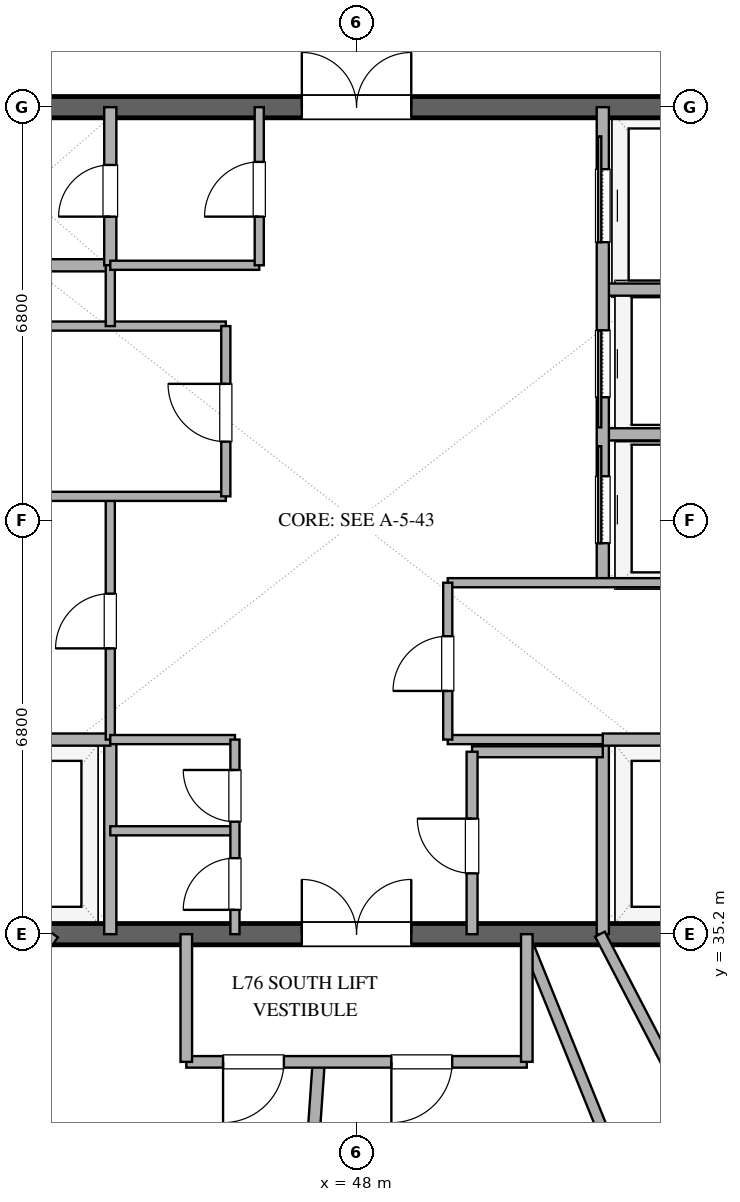
"""IFC4 building model, lengths in metres.
Left out: names, types, materials, properties, quantities, classifications, styles, units other than length and angle.
Written with IfcOpenShell. Run it as: python <this file> out.ifc"""

import sys

from ifc_helpers import new_model, si_unit, direction, frame, frame_2d, origin, place, context, subcontext, project, spatial, rectangle, extrude, element, fill, save


model = new_model("IFC4")
c1 = context("Model", 3, precision=1e-05, world=origin(), true_north=direction((0.0, 1.0)))
c2 = subcontext(c1, "Body", "Model", "MODEL_VIEW")
j1 = project(units=[si_unit("LENGTHUNIT", "METRE"), si_unit("PLANEANGLEUNIT", "RADIAN")], contexts=[c1])
p1 = place(None, origin())
s1 = spatial("IfcSite", under=j1, at=p1, CompositionType="ELEMENT")
p2 = place(p1, origin())
s2 = spatial("IfcBuilding", under=s1, at=p2, CompositionType="ELEMENT")
p3 = place(p2, frame((0.0, 0.0, 294.6)))
s3 = spatial("IfcBuildingStorey", under=s2, at=p3, CompositionType="ELEMENT", Elevation=294.6)
p4 = place(p3, frame((41.0, 35.2, 0.0), z_axis=(0.0, 0.0, 1.0), x_axis=(1.0, 0.0, 0.0)))
e1 = element("IfcWall", 1, at=p4, inside=s3, PredefinedType="SHEAR", context=c2, shape_type="SweptSolid", body=[
    extrude(rectangle(XDim=14.0, YDim=0.35, at=frame_2d((7.0, 0.0))), origin(), (0.0, 0.0, 1.0), 3.37),
])
p5 = place(p4, frame((6.1, 0.0, 0.0)))
e2 = element("IfcOpeningElement", 2, at=p5, cuts=e1, PredefinedType="OPENING", context=c2, shape_type="SweptSolid", body=[
    extrude(rectangle(XDim=1.8, YDim=2.25, at=frame_2d((0.9, 1.125))), frame((0.0, 0.185, 0.0), z_axis=(0.0, -1.0, 0.0), x_axis=(1.0, 0.0, 0.0)), (0.0, 0.0, 1.0), 0.37),
])
p6 = place(p3, frame((41.0, 48.8, 0.0), z_axis=(0.0, 0.0, 1.0), x_axis=(1.0, 0.0, 0.0)))
e3 = element("IfcWall", 3, at=p6, inside=s3, PredefinedType="SHEAR", context=c2, shape_type="SweptSolid", body=[
    extrude(rectangle(XDim=14.0, YDim=0.35, at=frame_2d((7.0, 0.0))), origin(), (0.0, 0.0, 1.0), 3.37),
])
p7 = place(p6, frame((6.1, 0.0, 0.0)))
e4 = element("IfcOpeningElement", 4, at=p7, cuts=e3, PredefinedType="OPENING", context=c2, shape_type="SweptSolid", body=[
    extrude(rectangle(XDim=1.8, YDim=2.25, at=frame_2d((0.9, 1.125))), frame((0.0, 0.185, 0.0), z_axis=(0.0, -1.0, 0.0), x_axis=(1.0, 0.0, 0.0)), (0.0, 0.0, 1.0), 0.37),
])
p8 = place(p3, frame((43.95, 35.2, 0.0), z_axis=(0.0, 0.0, 1.0), x_axis=(0.0, 1.0, 0.0)))
e5 = element("IfcWall", 5, at=p8, inside=s3, PredefinedType="SOLIDWALL", context=c2, shape_type="SweptSolid", body=[
    extrude(rectangle(XDim=3.2, YDim=0.2, at=frame_2d((1.6, 0.0))), origin(), (0.0, 0.0, 1.0), 2.73),
])
p9 = place(p3, frame((41.0, 38.4, 0.0), z_axis=(0.0, 0.0, 1.0), x_axis=(1.0, 0.0, 0.0)))
e6 = element("IfcWall", 6, at=p9, inside=s3, PredefinedType="SOLIDWALL", context=c2, shape_type="SweptSolid", body=[
    extrude(rectangle(XDim=2.95, YDim=0.2, at=frame_2d((1.475, 0.0))), origin(), (0.0, 0.0, 1.0), 2.73),
])
p10 = place(p3, frame((52.05, 35.2, 0.0), z_axis=(0.0, 0.0, 1.0), x_axis=(0.0, 1.0, 0.0)))
e7 = element("IfcWall", 7, at=p10, inside=s3, PredefinedType="SOLIDWALL", context=c2, shape_type="SweptSolid", body=[
    extrude(rectangle(XDim=3.2, YDim=0.2, at=frame_2d((1.6, 0.0))), origin(), (0.0, 0.0, 1.0), 2.73),
])
for number, where, z_axis, x_axis in (
    (8, (52.05, 38.4, 0.0), (0.0, 0.0, 1.0), (1.0, 0.0, 0.0)),
    (9, (41.0, 46.2, 0.0), (0.0, 0.0, 1.0), (1.0, 0.0, 0.0)),
):
    element("IfcWall", number, at=place(p3, frame(where, z_axis=z_axis, x_axis=x_axis)), inside=s3, PredefinedType="SOLIDWALL", context=c2, shape_type="SweptSolid", body=[
        extrude(rectangle(XDim=2.95, YDim=0.2, at=frame_2d((1.475, 0.0))), origin(), (0.0, 0.0, 1.0), 2.73),
    ])
p11 = place(p3, frame((43.95, 46.2, 0.0), z_axis=(0.0, 0.0, 1.0), x_axis=(0.0, 1.0, 0.0)))
e10 = element("IfcWall", 10, at=p11, inside=s3, PredefinedType="SOLIDWALL", context=c2, shape_type="SweptSolid", body=[
    extrude(rectangle(XDim=2.6, YDim=0.2, at=frame_2d((1.3, 0.0))), origin(), (0.0, 0.0, 1.0), 2.73),
])
p12 = place(p11, frame((0.8, 0.0, 0.0)))
e11 = element("IfcOpeningElement", 11, at=p12, cuts=e10, PredefinedType="OPENING", context=c2, shape_type="SweptSolid", body=[
    extrude(rectangle(XDim=0.85, YDim=2.15, at=frame_2d((0.425, 1.075))), frame((0.0, 0.11, 0.0), z_axis=(0.0, -1.0, 0.0), x_axis=(1.0, 0.0, 0.0)), (0.0, 0.0, 1.0), 0.22),
])
p13 = place(p3, frame((43.95, 38.4, 0.0), z_axis=(0.0, 0.0, 1.0), x_axis=(0.0, 1.0, 0.0)))
e12 = element("IfcWall", 12, at=p13, inside=s3, PredefinedType="PARTITIONING", context=c2, shape_type="SweptSolid", body=[
    extrude(rectangle(XDim=4.0, YDim=0.15, at=frame_2d((2.0, 0.0))), origin(), (0.0, 0.0, 1.0), 2.73),
])
p14 = place(p13, frame((1.5, 0.0, 0.0)))
e13 = element("IfcOpeningElement", 13, at=p14, cuts=e12, PredefinedType="OPENING", context=c2, shape_type="SweptSolid", body=[
    extrude(rectangle(XDim=0.9, YDim=2.15, at=frame_2d((0.45, 1.075))), frame((0.0, 0.085, 0.0), z_axis=(0.0, -1.0, 0.0), x_axis=(1.0, 0.0, 0.0)), (0.0, 0.0, 1.0), 0.17),
])
for number, where, z_axis, x_axis in (
    (14, (41.0, 42.4, 0.0), (0.0, 0.0, 1.0), (1.0, 0.0, 0.0)),
    (15, (41.0, 45.2, 0.0), (0.0, 0.0, 1.0), (1.0, 0.0, 0.0)),
):
    element("IfcWall", number, at=place(p3, frame(where, z_axis=z_axis, x_axis=x_axis)), inside=s3, PredefinedType="PARTITIONING", context=c2, shape_type="SweptSolid", body=[
        extrude(rectangle(XDim=4.85, YDim=0.15, at=frame_2d((2.425, 0.0))), origin(), (0.0, 0.0, 1.0), 2.73),
    ])
p15 = place(p3, frame((43.95, 45.2, 0.0), z_axis=(0.0, 0.0, 1.0), x_axis=(0.0, 1.0, 0.0)))
e16 = element("IfcWall", 16, at=p15, inside=s3, PredefinedType="PARTITIONING", context=c2, shape_type="SweptSolid", body=[
    extrude(rectangle(XDim=1.0, YDim=0.15, at=frame_2d((0.5, 0.0))), origin(), (0.0, 0.0, 1.0), 2.73),
])
p16 = place(p3, frame((45.85, 42.4, 0.0), z_axis=(0.0, 0.0, 1.0), x_axis=(0.0, 1.0, 0.0)))
e17 = element("IfcWall", 17, at=p16, inside=s3, PredefinedType="PARTITIONING", context=c2, shape_type="SweptSolid", body=[
    extrude(rectangle(XDim=2.8, YDim=0.15, at=frame_2d((1.4, 0.0))), origin(), (0.0, 0.0, 1.0), 2.73),
])
p17 = place(p16, frame((0.9, 0.0, 0.0)))
e18 = element("IfcOpeningElement", 18, at=p17, cuts=e17, PredefinedType="OPENING", context=c2, shape_type="SweptSolid", body=[
    extrude(rectangle(XDim=0.95, YDim=2.15, at=frame_2d((0.475, 1.075))), frame((0.0, 0.085, 0.0), z_axis=(0.0, -1.0, 0.0), x_axis=(1.0, 0.0, 0.0)), (0.0, 0.0, 1.0), 0.17),
])
for number, where, z_axis, x_axis in (
    (19, (52.05, 43.42, 0.0), (0.0, 0.0, 1.0), (1.0, 0.0, 0.0)),
    (20, (52.05, 45.8, 0.0), (0.0, 0.0, 1.0), (1.0, 0.0, 0.0)),
):
    element("IfcWall", number, at=place(p3, frame(where, z_axis=z_axis, x_axis=x_axis)), inside=s3, PredefinedType="SOLIDWALL", context=c2, shape_type="SweptSolid", body=[
        extrude(rectangle(XDim=2.95, YDim=0.2, at=frame_2d((1.475, 0.0))), origin(), (0.0, 0.0, 1.0), 2.73),
    ])
p18 = place(p3, frame((52.05, 40.98, 0.0), z_axis=(0.0, 0.0, 1.0), x_axis=(0.0, 1.0, 0.0)))
e21 = element("IfcWall", 21, at=p18, inside=s3, PredefinedType="SOLIDWALL", context=c2, shape_type="SweptSolid", body=[
    extrude(rectangle(XDim=7.82, YDim=0.2, at=frame_2d((3.91, 0.0))), origin(), (0.0, 0.0, 1.0), 2.73),
])
p19 = place(p18, frame((0.65, 0.0, 0.0)))
e22 = element("IfcOpeningElement", 22, at=p19, cuts=e21, PredefinedType="OPENING", context=c2, shape_type="SweptSolid", body=[
    extrude(rectangle(XDim=1.1, YDim=2.2, at=frame_2d((0.55, 1.1))), frame((0.0, 0.11, 0.0), z_axis=(0.0, -1.0, 0.0), x_axis=(1.0, 0.0, 0.0)), (0.0, 0.0, 1.0), 0.22),
])
p20 = place(p18, frame((3.05, 0.0, 0.0)))
e23 = element("IfcOpeningElement", 23, at=p20, cuts=e21, PredefinedType="OPENING", context=c2, shape_type="SweptSolid", body=[
    extrude(rectangle(XDim=1.1, YDim=2.2, at=frame_2d((0.55, 1.1))), frame((0.0, 0.11, 0.0), z_axis=(0.0, -1.0, 0.0), x_axis=(1.0, 0.0, 0.0)), (0.0, 0.0, 1.0), 0.22),
])
p21 = place(p18, frame((5.6, 0.0, 0.0)))
e24 = element("IfcOpeningElement", 24, at=p21, cuts=e21, PredefinedType="OPENING", context=c2, shape_type="SweptSolid", body=[
    extrude(rectangle(XDim=1.2, YDim=2.2, at=frame_2d((0.6, 1.1))), frame((0.0, 0.11, 0.0), z_axis=(0.0, -1.0, 0.0), x_axis=(1.0, 0.0, 0.0)), (0.0, 0.0, 1.0), 0.22),
])
p22 = place(p3, frame((49.5, 40.98, 0.0), z_axis=(0.0, 0.0, 1.0), x_axis=(1.0, 0.0, 0.0)))
e25 = element("IfcWall", 25, at=p22, inside=s3, PredefinedType="PARTITIONING", context=c2, shape_type="SweptSolid", body=[
    extrude(rectangle(XDim=5.5, YDim=0.15, at=frame_2d((2.75, 0.0))), origin(), (0.0, 0.0, 1.0), 2.73),
])
p23 = place(p3, frame((49.5, 38.4, 0.0), z_axis=(0.0, 0.0, 1.0), x_axis=(1.0, 0.0, 0.0)))
e26 = element("IfcWall", 26, at=p23, inside=s3, PredefinedType="PARTITIONING", context=c2, shape_type="SweptSolid", body=[
    extrude(rectangle(XDim=2.55, YDim=0.15, at=frame_2d((1.275, 0.0))), origin(), (0.0, 0.0, 1.0), 2.73),
])
p24 = place(p3, frame((49.5, 38.4, 0.0), z_axis=(0.0, 0.0, 1.0), x_axis=(0.0, 1.0, 0.0)))
e27 = element("IfcWall", 27, at=p24, inside=s3, PredefinedType="PARTITIONING", context=c2, shape_type="SweptSolid", body=[
    extrude(rectangle(XDim=2.58, YDim=0.15, at=frame_2d((1.29, 0.0))), origin(), (0.0, 0.0, 1.0), 2.73),
])
p25 = place(p24, frame((0.8, 0.0, 0.0)))
e28 = element("IfcOpeningElement", 28, at=p25, cuts=e27, PredefinedType="OPENING", context=c2, shape_type="SweptSolid", body=[
    extrude(rectangle(XDim=0.9, YDim=2.15, at=frame_2d((0.45, 1.075))), frame((0.0, 0.085, 0.0), z_axis=(0.0, -1.0, 0.0), x_axis=(1.0, 0.0, 0.0)), (0.0, 0.0, 1.0), 0.17),
])
for number, where, z_axis, x_axis in (
    (29, (43.95, 36.9, 0.0), (0.0, 0.0, 1.0), (1.0, 0.0, 0.0)),
    (30, (43.95, 38.4, 0.0), (0.0, 0.0, 1.0), (1.0, 0.0, 0.0)),
):
    element("IfcWall", number, at=place(p3, frame(where, z_axis=z_axis, x_axis=x_axis)), inside=s3, PredefinedType="PARTITIONING", context=c2, shape_type="SweptSolid", body=[
        extrude(rectangle(XDim=2.05, YDim=0.15, at=frame_2d((1.025, 0.0))), origin(), (0.0, 0.0, 1.0), 2.73),
    ])
p26 = place(p3, frame((46.0, 35.2, 0.0), z_axis=(0.0, 0.0, 1.0), x_axis=(0.0, 1.0, 0.0)))
e31 = element("IfcWall", 31, at=p26, inside=s3, PredefinedType="PARTITIONING", context=c2, shape_type="SweptSolid", body=[
    extrude(rectangle(XDim=3.2, YDim=0.15, at=frame_2d((1.6, 0.0))), origin(), (0.0, 0.0, 1.0), 2.73),
])
p27 = place(p26, frame((0.4, 0.0, 0.0)))
e32 = element("IfcOpeningElement", 32, at=p27, cuts=e31, PredefinedType="OPENING", context=c2, shape_type="SweptSolid", body=[
    extrude(rectangle(XDim=0.85, YDim=2.15, at=frame_2d((0.425, 1.075))), frame((0.0, 0.085, 0.0), z_axis=(0.0, -1.0, 0.0), x_axis=(1.0, 0.0, 0.0)), (0.0, 0.0, 1.0), 0.17),
])
p28 = place(p26, frame((1.85, 0.0, 0.0)))
e33 = element("IfcOpeningElement", 33, at=p28, cuts=e31, PredefinedType="OPENING", context=c2, shape_type="SweptSolid", body=[
    extrude(rectangle(XDim=0.85, YDim=2.15, at=frame_2d((0.425, 1.075))), frame((0.0, 0.085, 0.0), z_axis=(0.0, -1.0, 0.0), x_axis=(1.0, 0.0, 0.0)), (0.0, 0.0, 1.0), 0.17),
])
p29 = place(p3, frame((43.95, 46.2, 0.0), z_axis=(0.0, 0.0, 1.0), x_axis=(1.0, 0.0, 0.0)))
e34 = element("IfcWall", 34, at=p29, inside=s3, PredefinedType="PARTITIONING", context=c2, shape_type="SweptSolid", body=[
    extrude(rectangle(XDim=2.45, YDim=0.15, at=frame_2d((1.225, 0.0))), origin(), (0.0, 0.0, 1.0), 2.73),
])
p30 = place(p3, frame((46.4, 46.2, 0.0), z_axis=(0.0, 0.0, 1.0), x_axis=(0.0, 1.0, 0.0)))
e35 = element("IfcWall", 35, at=p30, inside=s3, PredefinedType="PARTITIONING", context=c2, shape_type="SweptSolid", body=[
    extrude(rectangle(XDim=2.6, YDim=0.15, at=frame_2d((1.3, 0.0))), origin(), (0.0, 0.0, 1.0), 2.73),
])
p31 = place(p30, frame((0.8, 0.0, 0.0)))
e36 = element("IfcOpeningElement", 36, at=p31, cuts=e35, PredefinedType="OPENING", context=c2, shape_type="SweptSolid", body=[
    extrude(rectangle(XDim=0.9, YDim=2.15, at=frame_2d((0.45, 1.075))), frame((0.0, 0.085, 0.0), z_axis=(0.0, -1.0, 0.0), x_axis=(1.0, 0.0, 0.0)), (0.0, 0.0, 1.0), 0.17),
])
p32 = place(p3, frame((49.9, 38.2, 0.0), z_axis=(0.0, 0.0, 1.0), x_axis=(1.0, 0.0, 0.0)))
e37 = element("IfcWall", 37, at=p32, inside=s3, PredefinedType="PLUMBINGWALL", context=c2, shape_type="SweptSolid", body=[
    extrude(rectangle(XDim=2.15, YDim=0.18, at=frame_2d((1.075, 0.0))), origin(), (0.0, 0.0, 1.0), 2.73),
])
p33 = place(p3, frame((49.9, 35.2, 0.0), z_axis=(0.0, 0.0, 1.0), x_axis=(0.0, 1.0, 0.0)))
e38 = element("IfcWall", 38, at=p33, inside=s3, PredefinedType="PLUMBINGWALL", context=c2, shape_type="SweptSolid", body=[
    extrude(rectangle(XDim=3.0, YDim=0.18, at=frame_2d((1.5, 0.0))), origin(), (0.0, 0.0, 1.0), 2.73),
])
p34 = place(p33, frame((1.0, 0.0, 0.0)))
e39 = element("IfcOpeningElement", 39, at=p34, cuts=e38, PredefinedType="OPENING", context=c2, shape_type="SweptSolid", body=[
    extrude(rectangle(XDim=0.9, YDim=2.1, at=frame_2d((0.45, 1.05))), frame((0.0, 0.1, 0.0), z_axis=(0.0, -1.0, 0.0), x_axis=(1.0, 0.0, 0.0)), (0.0, 0.0, 1.0), 0.2),
])
p35 = place(p3, frame((47.378, 33.1, 0.0), z_axis=(0.0, 0.0, 1.0), x_axis=(-0.069765360577, -0.997563428792, 0.0)))
e40 = element("IfcWall", 40, at=p35, inside=s3, PredefinedType="PARTITIONING", context=c2, shape_type="SweptSolid", body=[
    extrude(rectangle(XDim=10.82, YDim=0.2, at=frame_2d((5.41, 0.0))), origin(), (0.0, 0.0, 1.0), 2.73),
])
p36 = place(p3, frame((55.736, 28.027, 0.0), z_axis=(0.0, 0.0, 1.0), x_axis=(-0.461598928477, 0.88708873808, 0.0)))
e41 = element("IfcWall", 41, at=p36, inside=s3, PredefinedType="PLUMBINGWALL", context=c2, shape_type="SweptSolid", body=[
    extrude(rectangle(XDim=8.086, YDim=0.18, at=frame_2d((4.043, 0.0))), origin(), (0.0, 0.0, 1.0), 2.73),
])
p37 = place(p36, frame((3.618, 0.0, 0.0)))
e42 = element("IfcOpeningElement", 42, at=p37, cuts=e41, PredefinedType="OPENING", context=c2, shape_type="SweptSolid", body=[
    extrude(rectangle(XDim=0.85, YDim=2.1, at=frame_2d((0.425, 1.05))), frame((0.0, 0.1, 0.0), z_axis=(0.0, -1.0, 0.0), x_axis=(1.0, 0.0, 0.0)), (0.0, 0.0, 1.0), 0.2),
])
p38 = place(p3, frame((50.8, 35.07, 0.0), z_axis=(0.0, 0.0, 1.0), x_axis=(0.374600990238, -0.927186118378, 0.0)))
e43 = element("IfcWall", 43, at=p38, inside=s3, PredefinedType="PLUMBINGWALL", context=c2, shape_type="SweptSolid", body=[
    extrude(rectangle(XDim=7.901, YDim=0.18, at=frame_2d((3.95, 0.0))), origin(), (0.0, 0.0, 1.0), 2.73),
])
p39 = place(p3, frame((40.259, 31.439, 0.0), z_axis=(0.0, 0.0, 1.0), x_axis=(0.591168457908, 0.806548110391, 0.0)))
e44 = element("IfcWall", 44, at=p39, inside=s3, PredefinedType="PLUMBINGWALL", context=c2, shape_type="SweptSolid", body=[
    extrude(rectangle(XDim=4.663, YDim=0.18, at=frame_2d((2.332, 0.0))), origin(), (0.0, 0.0, 1.0), 2.73),
])
p40 = place(p39, frame((1.907, 0.0, 0.0)))
e45 = element("IfcOpeningElement", 45, at=p40, cuts=e44, PredefinedType="OPENING", context=c2, shape_type="SweptSolid", body=[
    extrude(rectangle(XDim=0.85, YDim=2.1, at=frame_2d((0.425, 1.05))), frame((0.0, 0.1, 0.0), z_axis=(0.0, -1.0, 0.0), x_axis=(1.0, 0.0, 0.0)), (0.0, 0.0, 1.0), 0.2),
])
p41 = place(p3, frame((50.8, 33.1, 0.0), z_axis=(0.0, 0.0, 1.0), x_axis=(-1.0, 0.0, 0.0)))
e46 = element("IfcWall", 46, at=p41, inside=s3, PredefinedType="PARTITIONING", context=c2, shape_type="SweptSolid", body=[
    extrude(rectangle(XDim=5.6, YDim=0.19, at=frame_2d((2.8, 0.0))), origin(), (0.0, 0.0, 1.0), 2.73),
])
p42 = place(p41, frame((1.227, 0.0, 0.0)))
e47 = element("IfcOpeningElement", 47, at=p42, cuts=e46, PredefinedType="OPENING", context=c2, shape_type="SweptSolid", body=[
    extrude(rectangle(XDim=1.0, YDim=2.2, at=frame_2d((0.5, 1.1))), frame((0.0, 0.105, 0.0), z_axis=(0.0, -1.0, 0.0), x_axis=(1.0, 0.0, 0.0)), (0.0, 0.0, 1.0), 0.21),
])
p43 = place(p41, frame((3.995, 0.0, 0.0)))
e48 = element("IfcOpeningElement", 48, at=p43, cuts=e46, PredefinedType="OPENING", context=c2, shape_type="SweptSolid", body=[
    extrude(rectangle(XDim=1.0, YDim=2.2, at=frame_2d((0.5, 1.1))), frame((0.0, 0.105, 0.0), z_axis=(0.0, -1.0, 0.0), x_axis=(1.0, 0.0, 0.0)), (0.0, 0.0, 1.0), 0.21),
])
for number, where, z_axis, x_axis in (
    (49, (45.2, 33.1, 0.0), (0.0, 0.0, 1.0), (0.0, 1.0, 0.0)),
    (50, (50.8, 35.2, 0.0), (0.0, 0.0, 1.0), (0.0, -1.0, 0.0)),
):
    element("IfcWall", number, at=place(p3, frame(where, z_axis=z_axis, x_axis=x_axis)), inside=s3, PredefinedType="PARTITIONING", context=c2, shape_type="SweptSolid", body=[
        extrude(rectangle(XDim=2.1, YDim=0.19, at=frame_2d((1.05, 0.0))), origin(), (0.0, 0.0, 1.0), 2.73),
    ])
p44 = place(p5, origin())
e51 = element("IfcDoor", 51, at=p44, inside=s3, OperationType="DOUBLE_DOOR_SINGLE_SWING", PredefinedType="DOOR", context=c2, shape_type="SweptSolid", body=[
    extrude(rectangle(XDim=1.8, YDim=2.25, at=frame_2d((0.9, 1.125))), frame((0.0, 0.025, 0.0), z_axis=(0.0, -1.0, 0.0), x_axis=(1.0, 0.0, 0.0)), (0.0, 0.0, 1.0), 0.05),
])
fill(e2, e51)
p45 = place(p7, origin())
e52 = element("IfcDoor", 52, at=p45, inside=s3, OperationType="DOUBLE_DOOR_SINGLE_SWING", PredefinedType="DOOR", context=c2, shape_type="SweptSolid", body=[
    extrude(rectangle(XDim=1.8, YDim=2.25, at=frame_2d((0.9, 1.125))), frame((0.0, 0.025, 0.0), z_axis=(0.0, -1.0, 0.0), x_axis=(1.0, 0.0, 0.0)), (0.0, 0.0, 1.0), 0.05),
])
fill(e4, e52)
p46 = place(p12, origin())
e53 = element("IfcDoor", 53, at=p46, inside=s3, OperationType="SINGLE_SWING_LEFT", PredefinedType="DOOR", context=c2, shape_type="SweptSolid", body=[
    extrude(rectangle(XDim=0.85, YDim=2.15, at=frame_2d((0.425, 1.075))), frame((0.0, 0.025, 0.0), z_axis=(0.0, -1.0, 0.0), x_axis=(1.0, 0.0, 0.0)), (0.0, 0.0, 1.0), 0.05),
])
fill(e11, e53)
p47 = place(p14, origin())
e54 = element("IfcDoor", 54, at=p47, inside=s3, OperationType="SINGLE_SWING_LEFT", PredefinedType="DOOR", context=c2, shape_type="SweptSolid", body=[
    extrude(rectangle(XDim=0.9, YDim=2.15, at=frame_2d((0.45, 1.075))), frame((0.0, 0.025, 0.0), z_axis=(0.0, -1.0, 0.0), x_axis=(1.0, 0.0, 0.0)), (0.0, 0.0, 1.0), 0.05),
])
fill(e13, e54)
p48 = place(p17, origin())
e55 = element("IfcDoor", 55, at=p48, inside=s3, OperationType="SINGLE_SWING_RIGHT", PredefinedType="DOOR", context=c2, shape_type="SweptSolid", body=[
    extrude(rectangle(XDim=0.95, YDim=2.15, at=frame_2d((0.475, 1.075))), frame((0.0, 0.025, 0.0), z_axis=(0.0, -1.0, 0.0), x_axis=(1.0, 0.0, 0.0)), (0.0, 0.0, 1.0), 0.05),
])
fill(e18, e55)
p49 = place(p19, origin())
e56 = element("IfcDoor", 56, at=p49, inside=s3, OperationType="SLIDING_TO_RIGHT", PredefinedType="DOOR", context=c2, shape_type="SweptSolid", body=[
    extrude(rectangle(XDim=1.1, YDim=2.2, at=frame_2d((0.55, 1.1))), frame((0.0, 0.025, 0.0), z_axis=(0.0, -1.0, 0.0), x_axis=(1.0, 0.0, 0.0)), (0.0, 0.0, 1.0), 0.05),
])
fill(e22, e56)
p50 = place(p20, origin())
e57 = element("IfcDoor", 57, at=p50, inside=s3, OperationType="SLIDING_TO_LEFT", PredefinedType="DOOR", context=c2, shape_type="SweptSolid", body=[
    extrude(rectangle(XDim=1.1, YDim=2.2, at=frame_2d((0.55, 1.1))), frame((0.0, 0.025, 0.0), z_axis=(0.0, -1.0, 0.0), x_axis=(1.0, 0.0, 0.0)), (0.0, 0.0, 1.0), 0.05),
])
fill(e23, e57)
p51 = place(p21, origin())
e58 = element("IfcDoor", 58, at=p51, inside=s3, OperationType="SLIDING_TO_RIGHT", PredefinedType="DOOR", context=c2, shape_type="SweptSolid", body=[
    extrude(rectangle(XDim=1.2, YDim=2.2, at=frame_2d((0.6, 1.1))), frame((0.0, 0.025, 0.0), z_axis=(0.0, -1.0, 0.0), x_axis=(1.0, 0.0, 0.0)), (0.0, 0.0, 1.0), 0.05),
])
fill(e24, e58)
p52 = place(p25, origin())
e59 = element("IfcDoor", 59, at=p52, inside=s3, OperationType="SINGLE_SWING_LEFT", PredefinedType="DOOR", context=c2, shape_type="SweptSolid", body=[
    extrude(rectangle(XDim=0.9, YDim=2.15, at=frame_2d((0.45, 1.075))), frame((0.0, 0.025, 0.0), z_axis=(0.0, -1.0, 0.0), x_axis=(1.0, 0.0, 0.0)), (0.0, 0.0, 1.0), 0.05),
])
fill(e28, e59)
p53 = place(p27, origin())
e60 = element("IfcDoor", 60, at=p53, inside=s3, OperationType="SINGLE_SWING_LEFT", PredefinedType="DOOR", context=c2, shape_type="SweptSolid", body=[
    extrude(rectangle(XDim=0.85, YDim=2.15, at=frame_2d((0.425, 1.075))), frame((0.0, 0.025, 0.0), z_axis=(0.0, -1.0, 0.0), x_axis=(1.0, 0.0, 0.0)), (0.0, 0.0, 1.0), 0.05),
])
fill(e32, e60)
p54 = place(p28, origin())
e61 = element("IfcDoor", 61, at=p54, inside=s3, OperationType="SINGLE_SWING_RIGHT", PredefinedType="DOOR", context=c2, shape_type="SweptSolid", body=[
    extrude(rectangle(XDim=0.85, YDim=2.15, at=frame_2d((0.425, 1.075))), frame((0.0, 0.025, 0.0), z_axis=(0.0, -1.0, 0.0), x_axis=(1.0, 0.0, 0.0)), (0.0, 0.0, 1.0), 0.05),
])
fill(e33, e61)
p55 = place(p31, origin())
e62 = element("IfcDoor", 62, at=p55, inside=s3, OperationType="SINGLE_SWING_LEFT", PredefinedType="DOOR", context=c2, shape_type="SweptSolid", body=[
    extrude(rectangle(XDim=0.9, YDim=2.15, at=frame_2d((0.45, 1.075))), frame((0.0, 0.025, 0.0), z_axis=(0.0, -1.0, 0.0), x_axis=(1.0, 0.0, 0.0)), (0.0, 0.0, 1.0), 0.05),
])
fill(e36, e62)
p56 = place(p34, origin())
e63 = element("IfcDoor", 63, at=p56, inside=s3, OperationType="SINGLE_SWING_RIGHT", PredefinedType="DOOR", context=c2, shape_type="SweptSolid", body=[
    extrude(rectangle(XDim=0.9, YDim=2.1, at=frame_2d((0.45, 1.05))), frame((0.0, 0.025, 0.0), z_axis=(0.0, -1.0, 0.0), x_axis=(1.0, 0.0, 0.0)), (0.0, 0.0, 1.0), 0.05),
])
fill(e39, e63)
p57 = place(p42, origin())
e64 = element("IfcDoor", 64, at=p57, inside=s3, OperationType="SINGLE_SWING_RIGHT", PredefinedType="DOOR", context=c2, shape_type="SweptSolid", body=[
    extrude(rectangle(XDim=1.0, YDim=2.2, at=frame_2d((0.5, 1.1))), frame((0.0, 0.025, 0.0), z_axis=(0.0, -1.0, 0.0), x_axis=(1.0, 0.0, 0.0)), (0.0, 0.0, 1.0), 0.05),
])
fill(e47, e64)
p58 = place(p43, origin())
e65 = element("IfcDoor", 65, at=p58, inside=s3, OperationType="SINGLE_SWING_RIGHT", PredefinedType="DOOR", context=c2, shape_type="SweptSolid", body=[
    extrude(rectangle(XDim=1.0, YDim=2.2, at=frame_2d((0.5, 1.1))), frame((0.0, 0.025, 0.0), z_axis=(0.0, -1.0, 0.0), x_axis=(1.0, 0.0, 0.0)), (0.0, 0.0, 1.0), 0.05),
])
fill(e48, e65)
save(model, sys.argv[1])
